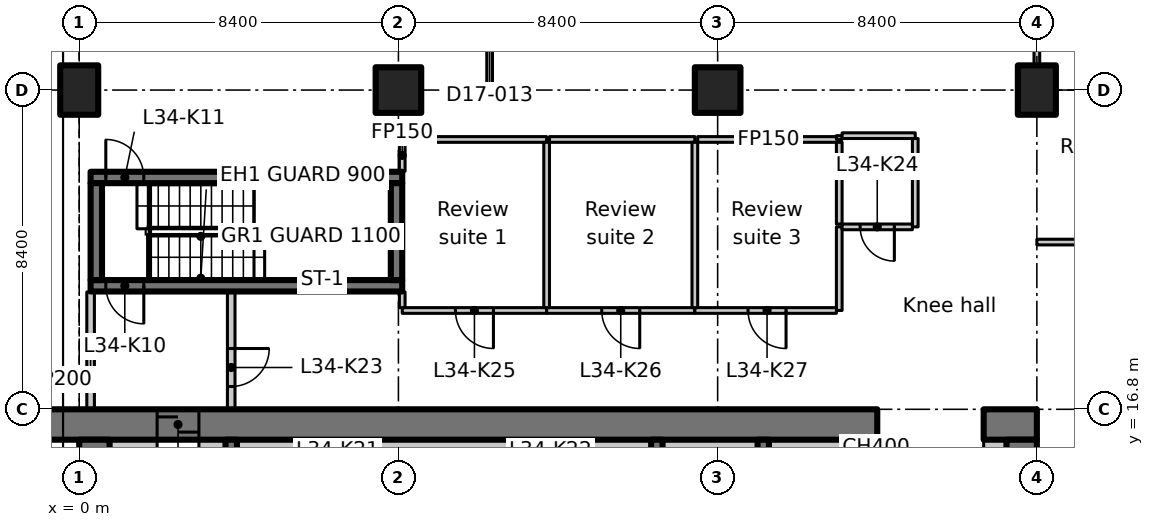
"""IFC4 building model, lengths in metres.
Left out: names, types, materials, properties, quantities, classifications, styles, units other than length and angle.
Written with IfcOpenShell. Run it as: python <this file> out.ifc"""

import sys

from ifc_helpers import new_model, si_unit, direction, frame, frame_2d, origin, origin_2d, place, context, subcontext, project, spatial, polyline, rectangle, outline, extrude, element, fill, save


model = new_model("IFC4")
c1 = context("Model", 3, precision=1e-05, world=origin(), true_north=direction((0.0, 1.0)))
c2 = subcontext(c1, "Body", "Model", "MODEL_VIEW")
j1 = project(units=[si_unit("LENGTHUNIT", "METRE"), si_unit("PLANEANGLEUNIT", "RADIAN")], contexts=[c1])
p1 = place(None, origin())
s1 = spatial("IfcSite", under=j1, at=p1, CompositionType="ELEMENT")
p2 = place(p1, origin())
s2 = spatial("IfcBuilding", under=s1, at=p2, CompositionType="ELEMENT")
p3 = place(p2, frame((0.0, 0.0, 138.5)))
s3 = spatial("IfcBuildingStorey", under=s2, at=p3, CompositionType="ELEMENT", Elevation=138.5)
p4 = place(p3, frame((0.0, 25.2, 0.0), z_axis=(0.0, 0.0, 1.0), x_axis=(1.0, 0.0, 0.0)))
e1 = element("IfcColumn", 1, at=p4, inside=s3, PredefinedType="COLUMN", context=c2, shape_type="SweptSolid", body=[
    extrude(rectangle(XDim=1.0, YDim=1.3, at=origin_2d()), origin(), (0.0, 0.0, 1.0), 3.35),
])
for number, where, z_axis, x_axis in (
    (2, (8.4, 25.2, 0.0), (0.0, 0.0, 1.0), (1.0, 0.0, 0.0)),
    (3, (16.8, 25.2, 0.0), (0.0, 0.0, 1.0), (1.0, 0.0, 0.0)),
):
    element("IfcColumn", number, at=place(p3, frame(where, z_axis=z_axis, x_axis=x_axis)), inside=s3, PredefinedType="COLUMN", context=c2, shape_type="SweptSolid", body=[
        extrude(rectangle(XDim=1.2, YDim=1.2, at=origin_2d()), origin(), (0.0, 0.0, 1.0), 3.35),
    ])
p5 = place(p3, frame((25.2, 25.2, 0.0), z_axis=(0.0, 0.0, 1.0), x_axis=(1.0, 0.0, 0.0)))
e4 = element("IfcColumn", 4, at=p5, inside=s3, PredefinedType="COLUMN", context=c2, shape_type="SweptSolid", body=[
    extrude(rectangle(XDim=1.0, YDim=1.3, at=origin_2d()), origin(), (0.0, 0.0, 1.0), 3.35),
])
p6 = place(p3, frame((-1.1, 16.4, 0.0), z_axis=(0.0, 0.0, 1.0), x_axis=(1.0, 0.0, 0.0)))
e5 = element("IfcWall", 5, at=p6, inside=s3, PredefinedType="SHEAR", context=c2, shape_type="SweptSolid", body=[
    extrude(rectangle(XDim=22.1, YDim=0.8, at=frame_2d((11.05, 0.0))), origin(), (0.0, 0.0, 1.0), 3.35),
])
p7 = place(p6, frame((3.15, 0.0, 0.0)))
e6 = element("IfcOpeningElement", 6, at=p7, cuts=e5, PredefinedType="OPENING", context=c2, shape_type="SweptSolid", body=[
    extrude(rectangle(XDim=1.1, YDim=2.3, at=frame_2d((0.55, 1.15))), frame((0.0, 0.41, 0.0), z_axis=(0.0, -1.0, 0.0), x_axis=(1.0, 0.0, 0.0)), (0.0, 0.0, 1.0), 0.82),
])
p8 = place(p3, frame((23.8, 16.4, 0.0), z_axis=(0.0, 0.0, 1.0), x_axis=(1.0, 0.0, 0.0)))
e7 = element("IfcWall", 7, at=p8, inside=s3, PredefinedType="SHEAR", context=c2, shape_type="SweptSolid", body=[
    extrude(rectangle(XDim=1.4, YDim=0.8, at=frame_2d((0.7, 0.0))), origin(), (0.0, 0.0, 1.0), 3.35),
])
p9 = place(p3, frame((0.4, 7.136, 0.0), z_axis=(0.0, 0.0, 1.0), x_axis=(0.0, 1.0, 0.0)))
e8 = element("IfcWall", 8, at=p9, inside=s3, PredefinedType="SHEAR", context=c2, shape_type="SweptSolid", body=[
    extrude(rectangle(XDim=8.864, YDim=0.8, at=frame_2d((4.432, 0.0))), origin(), (0.0, 0.0, 1.0), 3.35),
])
p10 = place(p3, frame((24.8, 12.6, 0.0), z_axis=(0.0, 0.0, 1.0), x_axis=(0.0, 1.0, 0.0)))
e9 = element("IfcWall", 9, at=p10, inside=s3, PredefinedType="SHEAR", context=c2, shape_type="SweptSolid", body=[
    extrude(rectangle(XDim=3.4, YDim=0.8, at=frame_2d((1.7, 0.0))), origin(), (0.0, 0.0, 1.0), 3.35),
])
p11 = place(p3, frame((0.8, 15.8, 0.0), z_axis=(0.0, 0.0, 1.0), x_axis=(1.0, 0.0, 0.0)))
e10 = element("IfcWall", 10, at=p11, inside=s3, PredefinedType="PARTITIONING", context=c2, shape_type="SweptSolid", body=[
    extrude(rectangle(XDim=1.25, YDim=0.4, at=frame_2d((0.625, 0.0))), origin(), (0.0, 0.0, 1.0), 3.35),
])
p12 = place(p3, frame((23.8, 15.8, 0.0), z_axis=(0.0, 0.0, 1.0), x_axis=(1.0, 0.0, 0.0)))
e11 = element("IfcWall", 11, at=p12, inside=s3, PredefinedType="PARTITIONING", context=c2, shape_type="SweptSolid", body=[
    extrude(rectangle(XDim=0.6, YDim=0.4, at=frame_2d((0.3, 0.0))), origin(), (0.0, 0.0, 1.0), 3.35),
])
for number, where, z_axis, x_axis in (
    (12, (4.0, 12.95, 0.0), (0.0, 0.0, 1.0), (0.0, 1.0, 0.0)),
    (13, (15.2, 12.95, 0.0), (0.0, 0.0, 1.0), (0.0, 1.0, 0.0)),
    (14, (18.0, 12.95, 0.0), (0.0, 0.0, 1.0), (0.0, 1.0, 0.0)),
    (15, (20.8, 12.95, 0.0), (0.0, 0.0, 1.0), (0.0, 1.0, 0.0)),
):
    element("IfcWall", number, at=place(p3, frame(where, z_axis=z_axis, x_axis=x_axis)), inside=s3, PredefinedType="SHEAR", context=c2, shape_type="SweptSolid", body=[
        extrude(rectangle(XDim=3.05, YDim=0.3, at=frame_2d((1.525, 0.0))), origin(), (0.0, 0.0, 1.0), 3.35),
    ])
p13 = place(p3, frame((8.5, 20.05, 0.0), z_axis=(0.0, 0.0, 1.0), x_axis=(-1.0, 0.0, 0.0)))
e16 = element("IfcWall", 16, at=p13, inside=s3, PredefinedType="SHEAR", context=c2, shape_type="SweptSolid", body=[
    extrude(rectangle(XDim=8.2, YDim=0.3, at=frame_2d((4.1, 0.0))), origin(), (0.0, 0.0, 1.0), 3.35),
])
p14 = place(p13, frame((6.8, 0.0, 0.0)))
e17 = element("IfcOpeningElement", 17, at=p14, cuts=e16, PredefinedType="OPENING", context=c2, shape_type="SweptSolid", body=[
    extrude(rectangle(XDim=1.0, YDim=2.1, at=frame_2d((0.5, 1.05))), frame((0.0, 0.16, 0.0), z_axis=(0.0, -1.0, 0.0), x_axis=(1.0, 0.0, 0.0)), (0.0, 0.0, 1.0), 0.32),
])
p15 = place(p3, frame((0.3, 22.9, 0.0), z_axis=(0.0, 0.0, 1.0), x_axis=(1.0, 0.0, 0.0)))
e18 = element("IfcWall", 18, at=p15, inside=s3, PredefinedType="SHEAR", context=c2, shape_type="SweptSolid", body=[
    extrude(rectangle(XDim=8.2, YDim=0.3, at=frame_2d((4.1, 0.0))), origin(), (0.0, 0.0, 1.0), 3.35),
])
p16 = place(p15, frame((0.4, 0.0, 0.0)))
e19 = element("IfcOpeningElement", 19, at=p16, cuts=e18, PredefinedType="OPENING", context=c2, shape_type="SweptSolid", body=[
    extrude(rectangle(XDim=1.0, YDim=2.1, at=frame_2d((0.5, 1.05))), frame((0.0, 0.16, 0.0), z_axis=(0.0, -1.0, 0.0), x_axis=(1.0, 0.0, 0.0)), (0.0, 0.0, 1.0), 0.32),
])
for number, where, z_axis, x_axis in (
    (20, (0.45, 20.2, 0.0), (0.0, 0.0, 1.0), (0.0, 1.0, 0.0)),
    (21, (8.35, 20.2, 0.0), (0.0, 0.0, 1.0), (0.0, 1.0, 0.0)),
):
    element("IfcWall", number, at=place(p3, frame(where, z_axis=z_axis, x_axis=x_axis)), inside=s3, PredefinedType="SHEAR", context=c2, shape_type="SweptSolid", body=[
        extrude(rectangle(XDim=2.55, YDim=0.3, at=frame_2d((1.275, 0.0))), origin(), (0.0, 0.0, 1.0), 3.35),
    ])
p17 = place(p3, frame((0.3, 16.812, 0.0), z_axis=(0.0, 0.0, 1.0), x_axis=(0.0, 1.0, 0.0)))
e22 = element("IfcWall", 22, at=p17, inside=s3, PredefinedType="PARTITIONING", context=c2, shape_type="SweptSolid", body=[
    extrude(rectangle(XDim=3.076, YDim=0.2, at=frame_2d((1.538, 0.0))), origin(), (0.0, 0.0, 1.0), 2.98),
])
p18 = place(p3, frame((4.0, 19.888, 0.0), z_axis=(0.0, 0.0, 1.0), x_axis=(0.0, -1.0, 0.0)))
e23 = element("IfcWall", 23, at=p18, inside=s3, PredefinedType="PARTITIONING", context=c2, shape_type="SweptSolid", body=[
    extrude(rectangle(XDim=3.076, YDim=0.2, at=frame_2d((1.538, 0.0))), origin(), (0.0, 0.0, 1.0), 3.35),
])
p19 = place(p18, frame((1.488, 0.0, 0.0)))
e24 = element("IfcOpeningElement", 24, at=p19, cuts=e23, PredefinedType="OPENING", context=c2, shape_type="SweptSolid", body=[
    extrude(rectangle(XDim=1.0, YDim=2.1, at=frame_2d((0.5, 1.05))), frame((0.0, 0.11, 0.0), z_axis=(0.0, -1.0, 0.0), x_axis=(1.0, 0.0, 0.0)), (0.0, 0.0, 1.0), 0.22),
])
p20 = place(p3, frame((12.3, 19.4, 0.0), z_axis=(0.0, 0.0, 1.0), x_axis=(-1.0, 0.0, 0.0)))
e25 = element("IfcWall", 25, at=p20, inside=s3, PredefinedType="PARTITIONING", context=c2, shape_type="SweptSolid", body=[
    extrude(rectangle(XDim=3.8, YDim=0.15, at=frame_2d((1.9, 0.0))), origin(), (0.0, 0.0, 1.0), 3.35),
])
p21 = place(p20, frame((1.4, 0.0, 0.0)))
e26 = element("IfcOpeningElement", 26, at=p21, cuts=e25, PredefinedType="OPENING", context=c2, shape_type="SweptSolid", body=[
    extrude(rectangle(XDim=1.0, YDim=2.1, at=frame_2d((0.5, 1.05))), frame((0.0, 0.085, 0.0), z_axis=(0.0, -1.0, 0.0), x_axis=(1.0, 0.0, 0.0)), (0.0, 0.0, 1.0), 0.17),
])
p22 = place(p3, frame((8.5, 19.475, 0.0), z_axis=(0.0, 0.0, 1.0), x_axis=(0.0, 1.0, 0.0)))
e27 = element("IfcWall", 27, at=p22, inside=s3, PredefinedType="PARTITIONING", context=c2, shape_type="SweptSolid", body=[
    extrude(rectangle(XDim=0.413, YDim=0.15, at=frame_2d((0.207, 0.0))), origin(), (0.0, 0.0, 1.0), 3.35),
])
p23 = place(p3, frame((8.5, 23.062, 0.0), z_axis=(0.0, 0.0, 1.0), x_axis=(0.0, 1.0, 0.0)))
e28 = element("IfcWall", 28, at=p23, inside=s3, PredefinedType="PARTITIONING", context=c2, shape_type="SweptSolid", body=[
    extrude(rectangle(XDim=0.838, YDim=0.15, at=frame_2d((0.419, 0.0))), origin(), (0.0, 0.0, 1.0), 3.35),
])
p24 = place(p3, frame((8.575, 23.9, 0.0), z_axis=(0.0, 0.0, 1.0), x_axis=(1.0, 0.0, 0.0)))
e29 = element("IfcWall", 29, at=p24, inside=s3, PredefinedType="PARTITIONING", context=c2, shape_type="SweptSolid", body=[
    extrude(rectangle(XDim=3.725, YDim=0.15, at=frame_2d((1.863, 0.0))), origin(), (0.0, 0.0, 1.0), 3.35),
])
p25 = place(p3, frame((16.2, 19.4, 0.0), z_axis=(0.0, 0.0, 1.0), x_axis=(-1.0, 0.0, 0.0)))
e30 = element("IfcWall", 30, at=p25, inside=s3, PredefinedType="PARTITIONING", context=c2, shape_type="SweptSolid", body=[
    extrude(rectangle(XDim=3.9, YDim=0.15, at=frame_2d((1.95, 0.0))), origin(), (0.0, 0.0, 1.0), 3.35),
])
p26 = place(p25, frame((1.45, 0.0, 0.0)))
e31 = element("IfcOpeningElement", 31, at=p26, cuts=e30, PredefinedType="OPENING", context=c2, shape_type="SweptSolid", body=[
    extrude(rectangle(XDim=1.0, YDim=2.1, at=frame_2d((0.5, 1.05))), frame((0.0, 0.085, 0.0), z_axis=(0.0, -1.0, 0.0), x_axis=(1.0, 0.0, 0.0)), (0.0, 0.0, 1.0), 0.17),
])
p27 = place(p3, frame((12.3, 23.825, 0.0), z_axis=(0.0, 0.0, 1.0), x_axis=(0.0, -1.0, 0.0)))
e32 = element("IfcWall", 32, at=p27, inside=s3, PredefinedType="PARTITIONING", context=c2, shape_type="SweptSolid", body=[
    extrude(rectangle(XDim=4.35, YDim=0.15, at=frame_2d((2.175, 0.0))), origin(), (0.0, 0.0, 1.0), 3.35),
])
p28 = place(p3, frame((12.375, 23.9, 0.0), z_axis=(0.0, 0.0, 1.0), x_axis=(1.0, 0.0, 0.0)))
e33 = element("IfcWall", 33, at=p28, inside=s3, PredefinedType="PARTITIONING", context=c2, shape_type="SweptSolid", body=[
    extrude(rectangle(XDim=3.825, YDim=0.15, at=frame_2d((1.913, 0.0))), origin(), (0.0, 0.0, 1.0), 3.35),
])
p29 = place(p3, frame((20.0, 21.6, 0.0), z_axis=(0.0, 0.0, 1.0), x_axis=(0.0, -1.0, 0.0)))
e34 = element("IfcWall", 34, at=p29, inside=s3, PredefinedType="PARTITIONING", context=c2, shape_type="SweptSolid", body=[
    extrude(rectangle(XDim=2.2, YDim=0.15, at=frame_2d((1.1, 0.0))), origin(), (0.0, 0.0, 1.0), 3.35),
])
p30 = place(p3, frame((19.925, 19.4, 0.0), z_axis=(0.0, 0.0, 1.0), x_axis=(-1.0, 0.0, 0.0)))
e35 = element("IfcWall", 35, at=p30, inside=s3, PredefinedType="PARTITIONING", context=c2, shape_type="SweptSolid", body=[
    extrude(rectangle(XDim=3.725, YDim=0.15, at=frame_2d((1.863, 0.0))), origin(), (0.0, 0.0, 1.0), 3.35),
])
p31 = place(p30, frame((1.325, 0.0, 0.0)))
e36 = element("IfcOpeningElement", 36, at=p31, cuts=e35, PredefinedType="OPENING", context=c2, shape_type="SweptSolid", body=[
    extrude(rectangle(XDim=1.0, YDim=2.1, at=frame_2d((0.5, 1.05))), frame((0.0, 0.085, 0.0), z_axis=(0.0, -1.0, 0.0), x_axis=(1.0, 0.0, 0.0)), (0.0, 0.0, 1.0), 0.17),
])
p32 = place(p3, frame((16.2, 23.825, 0.0), z_axis=(0.0, 0.0, 1.0), x_axis=(0.0, -1.0, 0.0)))
e37 = element("IfcWall", 37, at=p32, inside=s3, PredefinedType="PARTITIONING", context=c2, shape_type="SweptSolid", body=[
    extrude(rectangle(XDim=4.35, YDim=0.15, at=frame_2d((2.175, 0.0))), origin(), (0.0, 0.0, 1.0), 3.35),
])
p33 = place(p3, frame((16.275, 23.9, 0.0), z_axis=(0.0, 0.0, 1.0), x_axis=(1.0, 0.0, 0.0)))
e38 = element("IfcWall", 38, at=p33, inside=s3, PredefinedType="PARTITIONING", context=c2, shape_type="SweptSolid", body=[
    extrude(rectangle(XDim=3.725, YDim=0.15, at=frame_2d((1.863, 0.0))), origin(), (0.0, 0.0, 1.0), 3.35),
])
p34 = place(p3, frame((20.0, 23.9, 0.0), z_axis=(0.0, 0.0, 1.0), x_axis=(0.0, 1.0, 0.0)))
e39 = element("IfcWall", 39, at=p34, inside=s3, PredefinedType="PARTITIONING", context=c2, shape_type="SweptSolid", body=[
    extrude(rectangle(XDim=0.1, YDim=0.15, at=frame_2d((0.05, 0.0))), origin(), (0.0, 0.0, 1.0), 3.35),
])
p35 = place(p3, frame((20.075, 24.0, 0.0), z_axis=(0.0, 0.0, 1.0), x_axis=(1.0, 0.0, 0.0)))
e40 = element("IfcWall", 40, at=p35, inside=s3, PredefinedType="PARTITIONING", context=c2, shape_type="SweptSolid", body=[
    extrude(rectangle(XDim=1.925, YDim=0.15, at=frame_2d((0.962, 0.0))), origin(), (0.0, 0.0, 1.0), 3.35),
])
p36 = place(p3, frame((22.0, 23.925, 0.0), z_axis=(0.0, 0.0, 1.0), x_axis=(0.0, -1.0, 0.0)))
e41 = element("IfcWall", 41, at=p36, inside=s3, PredefinedType="PARTITIONING", context=c2, shape_type="SweptSolid", body=[
    extrude(rectangle(XDim=2.325, YDim=0.15, at=frame_2d((1.163, 0.0))), origin(), (0.0, 0.0, 1.0), 3.35),
])
p37 = place(p3, frame((21.925, 21.6, 0.0), z_axis=(0.0, 0.0, 1.0), x_axis=(-1.0, 0.0, 0.0)))
e42 = element("IfcWall", 42, at=p37, inside=s3, PredefinedType="PARTITIONING", context=c2, shape_type="SweptSolid", body=[
    extrude(rectangle(XDim=1.85, YDim=0.15, at=frame_2d((0.925, 0.0))), origin(), (0.0, 0.0, 1.0), 3.35),
])
p38 = place(p37, frame((0.475, 0.0, 0.0)))
e43 = element("IfcOpeningElement", 43, at=p38, cuts=e42, PredefinedType="OPENING", context=c2, shape_type="SweptSolid", body=[
    extrude(rectangle(XDim=0.9, YDim=2.1, at=frame_2d((0.45, 1.05))), frame((0.0, 0.085, 0.0), z_axis=(0.0, -1.0, 0.0), x_axis=(1.0, 0.0, 0.0)), (0.0, 0.0, 1.0), 0.17),
])
p39 = place(p3, frame((20.0, 21.675, 0.0), z_axis=(0.0, 0.0, 1.0), x_axis=(0.0, 1.0, 0.0)))
e44 = element("IfcWall", 44, at=p39, inside=s3, PredefinedType="PARTITIONING", context=c2, shape_type="SweptSolid", body=[
    extrude(rectangle(XDim=2.15, YDim=0.15, at=frame_2d((1.075, 0.0))), origin(), (0.0, 0.0, 1.0), 3.35),
])
p40 = place(p3, frame((3.15, 15.8, 0.0), z_axis=(0.0, 0.0, 1.0), x_axis=(1.0, 0.0, 0.0)))
e45 = element("IfcWall", 45, at=p40, inside=s3, PredefinedType="PARTITIONING", context=c2, shape_type="SweptSolid", body=[
    extrude(rectangle(XDim=0.7, YDim=0.4, at=frame_2d((0.35, 0.0))), origin(), (0.0, 0.0, 1.0), 3.35),
])
p41 = place(p3, frame((4.15, 15.8, 0.0), z_axis=(0.0, 0.0, 1.0), x_axis=(1.0, 0.0, 0.0)))
e46 = element("IfcWall", 46, at=p41, inside=s3, PredefinedType="PARTITIONING", context=c2, shape_type="SweptSolid", body=[
    extrude(rectangle(XDim=10.9, YDim=0.4, at=frame_2d((5.45, 0.0))), origin(), (0.0, 0.0, 1.0), 3.35),
])
for number, where, z_axis, x_axis in (
    (47, (15.35, 15.8, 0.0), (0.0, 0.0, 1.0), (1.0, 0.0, 0.0)),
    (48, (18.15, 15.8, 0.0), (0.0, 0.0, 1.0), (1.0, 0.0, 0.0)),
):
    element("IfcWall", number, at=place(p3, frame(where, z_axis=z_axis, x_axis=x_axis)), inside=s3, PredefinedType="PARTITIONING", context=c2, shape_type="SweptSolid", body=[
        extrude(rectangle(XDim=2.5, YDim=0.4, at=frame_2d((1.25, 0.0))), origin(), (0.0, 0.0, 1.0), 3.35),
    ])
p42 = place(p3, frame((20.95, 15.8, 0.0), z_axis=(0.0, 0.0, 1.0), x_axis=(1.0, 0.0, 0.0)))
e49 = element("IfcWall", 49, at=p42, inside=s3, PredefinedType="PARTITIONING", context=c2, shape_type="SweptSolid", body=[
    extrude(rectangle(XDim=0.05, YDim=0.4, at=frame_2d((0.025, 0.0))), origin(), (0.0, 0.0, 1.0), 3.35),
])
p43 = place(p3, frame((25.2, 21.2, 0.0), z_axis=(0.0, 0.0, 1.0), x_axis=(1.0, 0.0, 0.0)))
e50 = element("IfcWall", 50, at=p43, inside=s3, PredefinedType="PARTITIONING", context=c2, shape_type="SweptSolid", body=[
    extrude(rectangle(XDim=4.2, YDim=0.15, at=frame_2d((2.1, 0.0))), origin(), (0.0, 0.0, 1.0), 3.33),
])
p44 = place(p3, frame((25.2, 31.0, 0.0), z_axis=(0.0, 0.0, 1.0), x_axis=(0.0, -1.0, 0.0)))
e51 = element("IfcWall", 51, at=p44, inside=s3, PredefinedType="PARTITIONING", context=c2, shape_type="SweptSolid", body=[
    extrude(outline(polyline([(0.0, 0.0), (5.13, 0.0), (5.13, 2.98), (0.0, 2.98), (0.0, 0.0)])), frame((0.0, 0.075, 0.0), z_axis=(0.0, -1.0, 0.0), x_axis=(1.0, 0.0, 0.0)), (0.0, 0.0, 1.0), 0.15),
])
p45 = place(p44, frame((1.93, 0.0, 0.0)))
e52 = element("IfcOpeningElement", 52, at=p45, cuts=e51, PredefinedType="OPENING", context=c2, shape_type="SweptSolid", body=[
    extrude(rectangle(XDim=1.1, YDim=2.1, at=frame_2d((0.55, 1.05))), frame((0.0, 0.085, 0.0), z_axis=(0.0, -1.0, 0.0), x_axis=(1.0, 0.0, 0.0)), (0.0, 0.0, 1.0), 0.17),
])
p46 = place(p3, frame((10.8, 25.2, 0.0), z_axis=(0.0, 0.0, 1.0), x_axis=(0.0, 1.0, 0.0)))
e53 = element("IfcWall", 53, at=p46, inside=s3, PredefinedType="PARTITIONING", context=c2, shape_type="SweptSolid", body=[
    extrude(rectangle(XDim=4.2, YDim=0.15, at=frame_2d((2.1, 0.0))), origin(), (0.0, 0.0, 1.0), 3.33),
])
p47 = place(p46, frame((1.5, 0.0, 0.0)))
e54 = element("IfcOpeningElement", 54, at=p47, cuts=e53, PredefinedType="OPENING", context=c2, shape_type="SweptSolid", body=[
    extrude(rectangle(XDim=1.1, YDim=2.1, at=frame_2d((0.55, 1.05))), frame((0.0, 0.085, 0.0), z_axis=(0.0, -1.0, 0.0), x_axis=(1.0, 0.0, 0.0)), (0.0, 0.0, 1.0), 0.17),
])
p48 = place(p7, origin())
e55 = element("IfcDoor", 55, at=p48, inside=s3, OperationType="SLIDING_TO_LEFT", PredefinedType="DOOR", context=c2, shape_type="SweptSolid", body=[
    extrude(rectangle(XDim=1.1, YDim=2.3, at=frame_2d((0.55, 1.15))), frame((0.0, 0.025, 0.0), z_axis=(0.0, -1.0, 0.0), x_axis=(1.0, 0.0, 0.0)), (0.0, 0.0, 1.0), 0.05),
])
fill(e6, e55)
p49 = place(p14, origin())
e56 = element("IfcDoor", 56, at=p49, inside=s3, OperationType="SINGLE_SWING_RIGHT", PredefinedType="DOOR", context=c2, shape_type="SweptSolid", body=[
    extrude(rectangle(XDim=1.0, YDim=2.1, at=frame_2d((0.5, 1.05))), frame((0.0, 0.025, 0.0), z_axis=(0.0, -1.0, 0.0), x_axis=(1.0, 0.0, 0.0)), (0.0, 0.0, 1.0), 0.05),
])
fill(e17, e56)
p50 = place(p16, origin())
e57 = element("IfcDoor", 57, at=p50, inside=s3, OperationType="SINGLE_SWING_LEFT", PredefinedType="DOOR", context=c2, shape_type="SweptSolid", body=[
    extrude(rectangle(XDim=1.0, YDim=2.1, at=frame_2d((0.5, 1.05))), frame((0.0, 0.025, 0.0), z_axis=(0.0, -1.0, 0.0), x_axis=(1.0, 0.0, 0.0)), (0.0, 0.0, 1.0), 0.05),
])
fill(e19, e57)
p51 = place(p19, origin())
e58 = element("IfcDoor", 58, at=p51, inside=s3, OperationType="SINGLE_SWING_LEFT", PredefinedType="DOOR", context=c2, shape_type="SweptSolid", body=[
    extrude(rectangle(XDim=1.0, YDim=2.1, at=frame_2d((0.5, 1.05))), frame((0.0, 0.025, 0.0), z_axis=(0.0, -1.0, 0.0), x_axis=(1.0, 0.0, 0.0)), (0.0, 0.0, 1.0), 0.05),
])
fill(e24, e58)
p52 = place(p38, origin())
e59 = element("IfcDoor", 59, at=p52, inside=s3, OperationType="SINGLE_SWING_RIGHT", PredefinedType="DOOR", context=c2, shape_type="SweptSolid", body=[
    extrude(rectangle(XDim=0.9, YDim=2.1, at=frame_2d((0.45, 1.05))), frame((0.0, 0.025, 0.0), z_axis=(0.0, -1.0, 0.0), x_axis=(1.0, 0.0, 0.0)), (0.0, 0.0, 1.0), 0.05),
])
fill(e43, e59)
p53 = place(p21, origin())
e60 = element("IfcDoor", 60, at=p53, inside=s3, OperationType="SINGLE_SWING_LEFT", PredefinedType="DOOR", context=c2, shape_type="SweptSolid", body=[
    extrude(rectangle(XDim=1.0, YDim=2.1, at=frame_2d((0.5, 1.05))), frame((0.0, 0.025, 0.0), z_axis=(0.0, -1.0, 0.0), x_axis=(1.0, 0.0, 0.0)), (0.0, 0.0, 1.0), 0.05),
])
fill(e26, e60)
p54 = place(p26, origin())
e61 = element("IfcDoor", 61, at=p54, inside=s3, OperationType="SINGLE_SWING_RIGHT", PredefinedType="DOOR", context=c2, shape_type="SweptSolid", body=[
    extrude(rectangle(XDim=1.0, YDim=2.1, at=frame_2d((0.5, 1.05))), frame((0.0, 0.025, 0.0), z_axis=(0.0, -1.0, 0.0), x_axis=(1.0, 0.0, 0.0)), (0.0, 0.0, 1.0), 0.05),
])
fill(e31, e61)
p55 = place(p31, origin())
e62 = element("IfcDoor", 62, at=p55, inside=s3, OperationType="SINGLE_SWING_LEFT", PredefinedType="DOOR", context=c2, shape_type="SweptSolid", body=[
    extrude(rectangle(XDim=1.0, YDim=2.1, at=frame_2d((0.5, 1.05))), frame((0.0, 0.025, 0.0), z_axis=(0.0, -1.0, 0.0), x_axis=(1.0, 0.0, 0.0)), (0.0, 0.0, 1.0), 0.05),
])
fill(e36, e62)
save(model, sys.argv[1])
